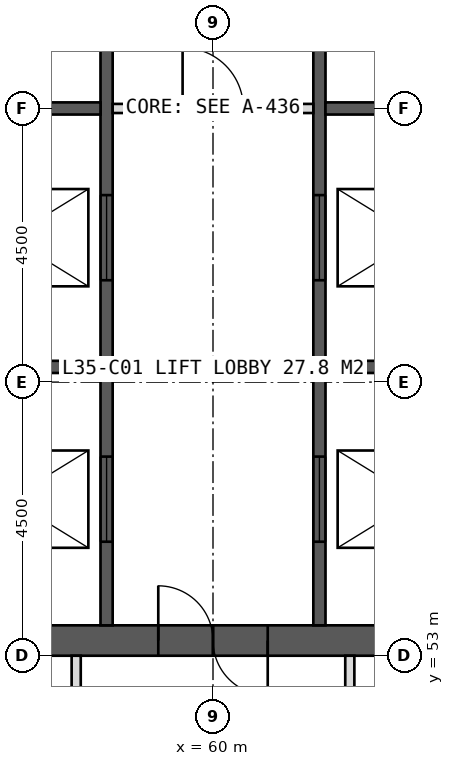
"""IFC4 building model, lengths in metres.
Left out: names, types, materials, properties, quantities, classifications, styles, units other than length and angle.
Written with IfcOpenShell. Run it as: python <this file> out.ifc"""

import sys

from ifc_helpers import new_model, si_unit, direction, frame, frame_2d, origin, place, context, subcontext, project, spatial, rectangle, extrude, element, fill, save


model = new_model("IFC4")
c1 = context("Model", 3, precision=1e-05, world=origin(), true_north=direction((0.0, 1.0)))
c2 = subcontext(c1, "Body", "Model", "MODEL_VIEW")
j1 = project(units=[si_unit("LENGTHUNIT", "METRE"), si_unit("PLANEANGLEUNIT", "RADIAN")], contexts=[c1])
p1 = place(None, origin())
s1 = spatial("IfcSite", under=j1, at=p1, CompositionType="ELEMENT")
p2 = place(p1, origin())
s2 = spatial("IfcBuilding", under=s1, at=p2, CompositionType="ELEMENT")
p3 = place(p2, frame((0.0, 0.0, 148.0)))
s3 = spatial("IfcBuildingStorey", under=s2, at=p3, CompositionType="ELEMENT", Elevation=148.0)
p4 = place(p3, frame((51.0, 53.25, 0.0), z_axis=(0.0, 0.0, 1.0), x_axis=(1.0, 0.0, 0.0)))
e1 = element("IfcWall", 1, at=p4, inside=s3, PredefinedType="SHEAR", context=c2, shape_type="SweptSolid", body=[
    extrude(rectangle(XDim=18.0, YDim=0.5, at=frame_2d((9.0, 0.0))), origin(), (0.0, 0.0, 1.0), 4.0),
])
p5 = place(p4, frame((8.1, 0.0, 0.0)))
e2 = element("IfcOpeningElement", 2, at=p5, cuts=e1, PredefinedType="OPENING", context=c2, shape_type="SweptSolid", body=[
    extrude(rectangle(XDim=1.8, YDim=2.2, at=frame_2d((0.9, 1.1))), frame((0.0, 0.26, 0.0), z_axis=(0.0, -1.0, 0.0), x_axis=(1.0, 0.0, 0.0)), (0.0, 0.0, 1.0), 0.52),
])
p6 = place(p3, frame((58.25, 53.5, 0.0), z_axis=(0.0, 0.0, 1.0), x_axis=(0.0, 1.0, 0.0)))
e3 = element("IfcWall", 3, at=p6, inside=s3, PredefinedType="SHEAR", context=c2, shape_type="SweptSolid", body=[
    extrude(rectangle(XDim=17.0, YDim=0.2, at=frame_2d((8.5, 0.0))), origin(), (0.0, 0.0, 1.0), 4.0),
])
p7 = place(p6, frame((1.375, 0.0, 0.0)))
e4 = element("IfcOpeningElement", 4, at=p7, cuts=e3, PredefinedType="OPENING", context=c2, shape_type="SweptSolid", body=[
    extrude(rectangle(XDim=1.4, YDim=2.2, at=frame_2d((0.7, 1.1))), frame((0.0, 0.11, 0.0), z_axis=(0.0, -1.0, 0.0), x_axis=(1.0, 0.0, 0.0)), (0.0, 0.0, 1.0), 0.22),
])
p8 = place(p6, frame((5.675, 0.0, 0.0)))
e5 = element("IfcOpeningElement", 5, at=p8, cuts=e3, PredefinedType="OPENING", context=c2, shape_type="SweptSolid", body=[
    extrude(rectangle(XDim=1.4, YDim=2.2, at=frame_2d((0.7, 1.1))), frame((0.0, 0.11, 0.0), z_axis=(0.0, -1.0, 0.0), x_axis=(1.0, 0.0, 0.0)), (0.0, 0.0, 1.0), 0.22),
])
p9 = place(p3, frame((61.75, 53.5, 0.0), z_axis=(0.0, 0.0, 1.0), x_axis=(0.0, 1.0, 0.0)))
e6 = element("IfcWall", 6, at=p9, inside=s3, PredefinedType="SHEAR", context=c2, shape_type="SweptSolid", body=[
    extrude(rectangle(XDim=17.0, YDim=0.2, at=frame_2d((8.5, 0.0))), origin(), (0.0, 0.0, 1.0), 4.0),
])
p10 = place(p9, frame((1.375, 0.0, 0.0)))
e7 = element("IfcOpeningElement", 7, at=p10, cuts=e6, PredefinedType="OPENING", context=c2, shape_type="SweptSolid", body=[
    extrude(rectangle(XDim=1.4, YDim=2.2, at=frame_2d((0.7, 1.1))), frame((0.0, 0.11, 0.0), z_axis=(0.0, -1.0, 0.0), x_axis=(1.0, 0.0, 0.0)), (0.0, 0.0, 1.0), 0.22),
])
p11 = place(p9, frame((5.675, 0.0, 0.0)))
e8 = element("IfcOpeningElement", 8, at=p11, cuts=e6, PredefinedType="OPENING", context=c2, shape_type="SweptSolid", body=[
    extrude(rectangle(XDim=1.4, YDim=2.2, at=frame_2d((0.7, 1.1))), frame((0.0, 0.11, 0.0), z_axis=(0.0, -1.0, 0.0), x_axis=(1.0, 0.0, 0.0)), (0.0, 0.0, 1.0), 0.22),
])
for number, where, z_axis, x_axis in (
    (9, (55.1, 57.75, 0.0), (0.0, 0.0, 1.0), (1.0, 0.0, 0.0)),
    (10, (61.85, 57.75, 0.0), (0.0, 0.0, 1.0), (1.0, 0.0, 0.0)),
    (11, (55.1, 62.0, 0.0), (0.0, 0.0, 1.0), (1.0, 0.0, 0.0)),
    (12, (61.85, 62.0, 0.0), (0.0, 0.0, 1.0), (1.0, 0.0, 0.0)),
):
    element("IfcWall", number, at=place(p3, frame(where, z_axis=z_axis, x_axis=x_axis)), inside=s3, PredefinedType="SHEAR", context=c2, shape_type="SweptSolid", body=[
        extrude(rectangle(XDim=3.05, YDim=0.2, at=frame_2d((1.525, 0.0))), origin(), (0.0, 0.0, 1.0), 4.0),
    ])
p12 = place(p3, frame((62.25, 53.0, 0.0), z_axis=(0.0, 0.0, 1.0), x_axis=(0.0, -1.0, 0.0)))
e13 = element("IfcWall", 13, at=p12, inside=s3, PredefinedType="PARTITIONING", context=c2, shape_type="SweptSolid", body=[
    extrude(rectangle(XDim=6.6, YDim=0.15, at=frame_2d((3.3, 0.0))), origin(), (0.0, 0.0, 1.0), 3.75),
])
p13 = place(p12, frame((0.6, 0.0, 0.0)))
e14 = element("IfcOpeningElement", 14, at=p13, cuts=e13, PredefinedType="OPENING", context=c2, shape_type="SweptSolid", body=[
    extrude(rectangle(XDim=0.9, YDim=2.1, at=frame_2d((0.45, 1.05))), frame((0.0, 0.085, 0.0), z_axis=(0.0, -1.0, 0.0), x_axis=(1.0, 0.0, 0.0)), (0.0, 0.0, 1.0), 0.17),
])
p14 = place(p3, frame((57.75, 53.0, 0.0), z_axis=(0.0, 0.0, 1.0), x_axis=(0.0, -1.0, 0.0)))
e15 = element("IfcWall", 15, at=p14, inside=s3, PredefinedType="PARTITIONING", context=c2, shape_type="SweptSolid", body=[
    extrude(rectangle(XDim=6.6, YDim=0.15, at=frame_2d((3.3, 0.0))), origin(), (0.0, 0.0, 1.0), 3.75),
])
p15 = place(p3, frame((58.35, 62.0, 0.0), z_axis=(0.0, 0.0, 1.0), x_axis=(1.0, 0.0, 0.0)))
e16 = element("IfcWall", 16, at=p15, inside=s3, PredefinedType="PARTITIONING", context=c2, shape_type="SweptSolid", body=[
    extrude(rectangle(XDim=3.3, YDim=0.15, at=frame_2d((1.65, 0.0))), origin(), (0.0, 0.0, 1.0), 3.75),
])
p16 = place(p15, frame((1.15, 0.0, 0.0)))
e17 = element("IfcOpeningElement", 17, at=p16, cuts=e16, PredefinedType="OPENING", context=c2, shape_type="SweptSolid", body=[
    extrude(rectangle(XDim=1.0, YDim=2.1, at=frame_2d((0.5, 1.05))), frame((0.0, 0.085, 0.0), z_axis=(0.0, -1.0, 0.0), x_axis=(1.0, 0.0, 0.0)), (0.0, 0.0, 1.0), 0.17),
])
p17 = place(p5, origin())
e18 = element("IfcDoor", 18, at=p17, inside=s3, OperationType="DOUBLE_DOOR_SINGLE_SWING", PredefinedType="DOOR", context=c2, shape_type="SweptSolid", body=[
    extrude(rectangle(XDim=1.8, YDim=2.2, at=frame_2d((0.9, 1.1))), frame((0.0, 0.025, 0.0), z_axis=(0.0, -1.0, 0.0), x_axis=(1.0, 0.0, 0.0)), (0.0, 0.0, 1.0), 0.05),
])
fill(e2, e18)
p18 = place(p7, origin())
e19 = element("IfcDoor", 19, at=p18, inside=s3, OperationType="SLIDING_TO_LEFT", PredefinedType="DOOR", context=c2, shape_type="SweptSolid", body=[
    extrude(rectangle(XDim=1.4, YDim=2.2, at=frame_2d((0.7, 1.1))), frame((0.0, 0.025, 0.0), z_axis=(0.0, -1.0, 0.0), x_axis=(1.0, 0.0, 0.0)), (0.0, 0.0, 1.0), 0.05),
])
fill(e4, e19)
p19 = place(p10, origin())
e20 = element("IfcDoor", 20, at=p19, inside=s3, OperationType="SLIDING_TO_LEFT", PredefinedType="DOOR", context=c2, shape_type="SweptSolid", body=[
    extrude(rectangle(XDim=1.4, YDim=2.2, at=frame_2d((0.7, 1.1))), frame((0.0, 0.025, 0.0), z_axis=(0.0, -1.0, 0.0), x_axis=(1.0, 0.0, 0.0)), (0.0, 0.0, 1.0), 0.05),
])
fill(e7, e20)
p20 = place(p8, origin())
e21 = element("IfcDoor", 21, at=p20, inside=s3, OperationType="SLIDING_TO_LEFT", PredefinedType="DOOR", context=c2, shape_type="SweptSolid", body=[
    extrude(rectangle(XDim=1.4, YDim=2.2, at=frame_2d((0.7, 1.1))), frame((0.0, 0.025, 0.0), z_axis=(0.0, -1.0, 0.0), x_axis=(1.0, 0.0, 0.0)), (0.0, 0.0, 1.0), 0.05),
])
fill(e5, e21)
p21 = place(p11, origin())
e22 = element("IfcDoor", 22, at=p21, inside=s3, OperationType="SLIDING_TO_LEFT", PredefinedType="DOOR", context=c2, shape_type="SweptSolid", body=[
    extrude(rectangle(XDim=1.4, YDim=2.2, at=frame_2d((0.7, 1.1))), frame((0.0, 0.025, 0.0), z_axis=(0.0, -1.0, 0.0), x_axis=(1.0, 0.0, 0.0)), (0.0, 0.0, 1.0), 0.05),
])
fill(e8, e22)
p22 = place(p16, origin())
e23 = element("IfcDoor", 23, at=p22, inside=s3, OperationType="SINGLE_SWING_LEFT", PredefinedType="DOOR", context=c2, shape_type="SweptSolid", body=[
    extrude(rectangle(XDim=1.0, YDim=2.1, at=frame_2d((0.5, 1.05))), frame((0.0, 0.025, 0.0), z_axis=(0.0, -1.0, 0.0), x_axis=(1.0, 0.0, 0.0)), (0.0, 0.0, 1.0), 0.05),
])
fill(e17, e23)
save(model, sys.argv[1])
